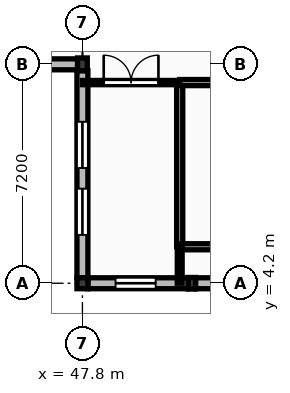
"""IFC4 building model, lengths in metres.
Left out: names, types, materials, properties, quantities, classifications, styles, units other than length and angle.
Written with IfcOpenShell. Run it as: python <this file> out.ifc"""

import sys

from ifc_helpers import new_model, si_unit, direction, frame, frame_2d, origin, origin_2d, place, context, subcontext, project, spatial, rectangle, extrude, element, fill, save


model = new_model("IFC4")
c1 = context("Model", 3, precision=1e-05, world=origin(), true_north=direction((0.0, 1.0)))
c2 = subcontext(c1, "Body", "Model", "MODEL_VIEW")
j1 = project(units=[si_unit("LENGTHUNIT", "METRE"), si_unit("PLANEANGLEUNIT", "RADIAN")], contexts=[c1])
p1 = place(None, origin())
s1 = spatial("IfcSite", under=j1, at=p1, CompositionType="ELEMENT")
p2 = place(p1, origin())
s2 = spatial("IfcBuilding", under=s1, at=p2, CompositionType="ELEMENT")
p3 = place(p2, frame((0.0, 0.0, 4.5)))
s3 = spatial("IfcBuildingStorey", under=s2, at=p3, CompositionType="ELEMENT", Elevation=4.5)
p4 = place(p3, frame((47.8, 4.2, 0.0), z_axis=(0.0, 0.0, 1.0), x_axis=(1.0, 0.0, 0.0)))
e1 = element("IfcColumn", 1, at=p4, inside=s3, PredefinedType="COLUMN", context=c2, shape_type="SweptSolid", body=[
    extrude(rectangle(XDim=0.36, YDim=0.36, at=origin_2d()), origin(), (0.0, 0.0, 1.0), 4.26),
])
p5 = place(p3, frame((47.8, 11.4, 0.0), z_axis=(0.0, 0.0, 1.0), x_axis=(1.0, 0.0, 0.0)))
e2 = element("IfcColumn", 2, at=p5, inside=s3, PredefinedType="COLUMN", context=c2, shape_type="SweptSolid", body=[
    extrude(rectangle(XDim=0.32, YDim=0.42, at=origin_2d()), origin(), (0.0, 0.0, 1.0), 4.26),
])
p6 = place(p3, frame((51.4, 4.2, 0.0), z_axis=(0.0, 0.0, 1.0), x_axis=(1.0, 0.0, 0.0)))
e3 = element("IfcColumn", 3, at=p6, inside=s3, PredefinedType="PILASTER", context=c2, shape_type="SweptSolid", body=[
    extrude(rectangle(XDim=0.24, YDim=0.38, at=origin_2d()), origin(), (0.0, 0.0, 1.0), 4.26),
])
p7 = place(p3, frame((40.78, 11.4, 0.0), z_axis=(0.0, 0.0, 1.0), x_axis=(1.0, 0.0, 0.0)))
e4 = element("IfcWall", 4, at=p7, inside=s3, PredefinedType="SOLIDWALL", context=c2, shape_type="SweptSolid", body=[
    extrude(rectangle(XDim=6.86, YDim=0.36, at=frame_2d((3.43, 0.0))), origin(), (0.0, 0.0, 1.0), 3.8),
])
p8 = place(p7, frame((1.33, 0.0, 1.0)))
e5 = element("IfcOpeningElement", 5, at=p8, cuts=e4, PredefinedType="OPENING", context=c2, shape_type="SweptSolid", body=[
    extrude(rectangle(XDim=1.76, YDim=1.95, at=frame_2d((0.88, 0.975))), frame((0.0, 0.19, 0.0), z_axis=(0.0, -1.0, 0.0), x_axis=(1.0, 0.0, 0.0)), (0.0, 0.0, 1.0), 0.38),
])
p9 = place(p7, frame((3.77, 0.0, 1.0)))
e6 = element("IfcOpeningElement", 6, at=p9, cuts=e4, PredefinedType="OPENING", context=c2, shape_type="SweptSolid", body=[
    extrude(rectangle(XDim=1.76, YDim=1.95, at=frame_2d((0.88, 0.975))), frame((0.0, 0.19, 0.0), z_axis=(0.0, -1.0, 0.0), x_axis=(1.0, 0.0, 0.0)), (0.0, 0.0, 1.0), 0.38),
])
p10 = place(p3, frame((47.98, 4.2, 0.0), z_axis=(0.0, 0.0, 1.0), x_axis=(1.0, 0.0, 0.0)))
e7 = element("IfcWall", 7, at=p10, inside=s3, PredefinedType="SOLIDWALL", context=c2, shape_type="SweptSolid", body=[
    extrude(rectangle(XDim=3.3, YDim=0.36, at=frame_2d((1.65, 0.0))), origin(), (0.0, 0.0, 1.0), 3.8),
])
p11 = place(p10, frame((0.91, 0.0, 1.5)))
e8 = element("IfcOpeningElement", 8, at=p11, cuts=e7, PredefinedType="OPENING", context=c2, shape_type="SweptSolid", body=[
    extrude(rectangle(XDim=1.32, YDim=1.25, at=frame_2d((0.66, 0.625))), frame((0.0, 0.19, 0.0), z_axis=(0.0, -1.0, 0.0), x_axis=(1.0, 0.0, 0.0)), (0.0, 0.0, 1.0), 0.38),
])
p12 = place(p3, frame((51.52, 4.2, 0.0), z_axis=(0.0, 0.0, 1.0), x_axis=(1.0, 0.0, 0.0)))
e9 = element("IfcWall", 9, at=p12, inside=s3, PredefinedType="SOLIDWALL", context=c2, shape_type="SweptSolid", body=[
    extrude(rectangle(XDim=3.32, YDim=0.36, at=frame_2d((1.66, 0.0))), origin(), (0.0, 0.0, 1.0), 3.8),
])
p13 = place(p12, frame((0.83, 0.0, 1.0)))
e10 = element("IfcOpeningElement", 10, at=p13, cuts=e9, PredefinedType="OPENING", context=c2, shape_type="SweptSolid", body=[
    extrude(rectangle(XDim=1.66, YDim=1.8, at=frame_2d((0.83, 0.9))), frame((0.0, 0.19, 0.0), z_axis=(0.0, -1.0, 0.0), x_axis=(1.0, 0.0, 0.0)), (0.0, 0.0, 1.0), 0.38),
])
p14 = place(p3, frame((47.8, 4.38, 0.0), z_axis=(0.0, 0.0, 1.0), x_axis=(0.0, 1.0, 0.0)))
e11 = element("IfcWall", 11, at=p14, inside=s3, PredefinedType="SOLIDWALL", context=c2, shape_type="SweptSolid", body=[
    extrude(rectangle(XDim=6.81, YDim=0.36, at=frame_2d((3.405, 0.0))), origin(), (0.0, 0.0, 1.0), 3.8),
])
p15 = place(p14, frame((1.41, 0.0, 1.0)))
e12 = element("IfcOpeningElement", 12, at=p15, cuts=e11, PredefinedType="OPENING", context=c2, shape_type="SweptSolid", body=[
    extrude(rectangle(XDim=1.52, YDim=1.8, at=frame_2d((0.76, 0.9))), frame((0.0, 0.19, 0.0), z_axis=(0.0, -1.0, 0.0), x_axis=(1.0, 0.0, 0.0)), (0.0, 0.0, 1.0), 0.38),
])
p16 = place(p14, frame((3.61, 0.0, 1.0)))
e13 = element("IfcOpeningElement", 13, at=p16, cuts=e11, PredefinedType="OPENING", context=c2, shape_type="SweptSolid", body=[
    extrude(rectangle(XDim=1.52, YDim=1.8, at=frame_2d((0.76, 0.9))), frame((0.0, 0.19, 0.0), z_axis=(0.0, -1.0, 0.0), x_axis=(1.0, 0.0, 0.0)), (0.0, 0.0, 1.0), 0.38),
])
p17 = place(p3, frame((47.8, 10.8, 0.0), z_axis=(0.0, 0.0, 1.0), x_axis=(1.0, 0.0, 0.0)))
e14 = element("IfcWall", 14, at=p17, inside=s3, PredefinedType="PARTITIONING", context=c2, shape_type="SweptSolid", body=[
    extrude(rectangle(XDim=3.2, YDim=0.14, at=frame_2d((1.6, 0.0))), origin(), (0.0, 0.0, 1.0), 4.18),
])
p18 = place(p17, frame((0.7, 0.0, 0.0)))
e15 = element("IfcOpeningElement", 15, at=p18, cuts=e14, PredefinedType="OPENING", context=c2, shape_type="SweptSolid", body=[
    extrude(rectangle(XDim=1.8, YDim=2.3, at=frame_2d((0.9, 1.15))), frame((0.0, 0.08, 0.0), z_axis=(0.0, -1.0, 0.0), x_axis=(1.0, 0.0, 0.0)), (0.0, 0.0, 1.0), 0.16),
])
p19 = place(p3, frame((51.0, 5.4, 0.0), z_axis=(0.0, 0.0, 1.0), x_axis=(0.0, 1.0, 0.0)))
e16 = element("IfcWall", 16, at=p19, inside=s3, PredefinedType="PARTITIONING", context=c2, shape_type="SweptSolid", body=[
    extrude(rectangle(XDim=5.33, YDim=0.2, at=frame_2d((2.665, 0.0))), origin(), (0.0, 0.0, 1.0), 4.18),
])
p20 = place(p3, frame((51.0, 10.8, 0.0), z_axis=(0.0, 0.0, 1.0), x_axis=(1.0, 0.0, 0.0)))
e17 = element("IfcWall", 17, at=p20, inside=s3, PredefinedType="PARTITIONING", context=c2, shape_type="SweptSolid", body=[
    extrude(rectangle(XDim=4.29, YDim=0.2, at=frame_2d((2.145, 0.0))), origin(), (0.0, 0.0, 1.0), 4.18),
])
p21 = place(p20, frame((1.405, 0.0, 0.0)))
e18 = element("IfcOpeningElement", 18, at=p21, cuts=e17, PredefinedType="OPENING", context=c2, shape_type="SweptSolid", body=[
    extrude(rectangle(XDim=1.48, YDim=2.25, at=frame_2d((0.74, 1.125))), frame((0.0, 0.11, 0.0), z_axis=(0.0, -1.0, 0.0), x_axis=(1.0, 0.0, 0.0)), (0.0, 0.0, 1.0), 0.22),
])
p22 = place(p3, frame((51.0, 5.4, 0.0), z_axis=(0.0, 0.0, 1.0), x_axis=(1.0, 0.0, 0.0)))
e19 = element("IfcWall", 19, at=p22, inside=s3, PredefinedType="PARTITIONING", context=c2, shape_type="SweptSolid", body=[
    extrude(rectangle(XDim=4.26, YDim=0.2, at=frame_2d((2.13, 0.0))), origin(), (0.0, 0.0, 1.0), 4.18),
])
p23 = place(p3, frame((51.0, 4.2, 0.0), z_axis=(0.0, 0.0, 1.0), x_axis=(0.0, 1.0, 0.0)))
e20 = element("IfcWall", 20, at=p23, inside=s3, PredefinedType="PARTITIONING", context=c2, shape_type="SweptSolid", body=[
    extrude(rectangle(XDim=1.2, YDim=0.16, at=frame_2d((0.6, 0.0))), origin(), (0.0, 0.0, 1.0), 4.18),
])
p24 = place(p11, origin())
e21 = element("IfcWindow", 21, at=p24, inside=s3, PartitioningType="SINGLE_PANEL", PredefinedType="WINDOW", context=c2, shape_type="SweptSolid", body=[
    extrude(rectangle(XDim=1.32, YDim=1.25, at=frame_2d((0.66, 0.625))), frame((0.0, 0.03, 0.0), z_axis=(0.0, -1.0, 0.0), x_axis=(1.0, 0.0, 0.0)), (0.0, 0.0, 1.0), 0.06),
])
fill(e8, e21)
p25 = place(p15, origin())
e22 = element("IfcWindow", 22, at=p25, inside=s3, PartitioningType="DOUBLE_PANEL_VERTICAL", PredefinedType="WINDOW", context=c2, shape_type="SweptSolid", body=[
    extrude(rectangle(XDim=1.52, YDim=1.8, at=frame_2d((0.76, 0.9))), frame((0.0, 0.03, 0.0), z_axis=(0.0, -1.0, 0.0), x_axis=(1.0, 0.0, 0.0)), (0.0, 0.0, 1.0), 0.06),
])
fill(e12, e22)
p26 = place(p16, origin())
e23 = element("IfcWindow", 23, at=p26, inside=s3, PartitioningType="DOUBLE_PANEL_VERTICAL", PredefinedType="WINDOW", context=c2, shape_type="SweptSolid", body=[
    extrude(rectangle(XDim=1.52, YDim=1.8, at=frame_2d((0.76, 0.9))), frame((0.0, 0.03, 0.0), z_axis=(0.0, -1.0, 0.0), x_axis=(1.0, 0.0, 0.0)), (0.0, 0.0, 1.0), 0.06),
])
fill(e13, e23)
p27 = place(p18, origin())
e24 = element("IfcDoor", 24, at=p27, inside=s3, OperationType="DOUBLE_DOOR_SINGLE_SWING", PredefinedType="DOOR", context=c2, shape_type="SweptSolid", body=[
    extrude(rectangle(XDim=1.8, YDim=2.3, at=frame_2d((0.9, 1.15))), frame((0.0, 0.025, 0.0), z_axis=(0.0, -1.0, 0.0), x_axis=(1.0, 0.0, 0.0)), (0.0, 0.0, 1.0), 0.05),
])
fill(e15, e24)
save(model, sys.argv[1])
